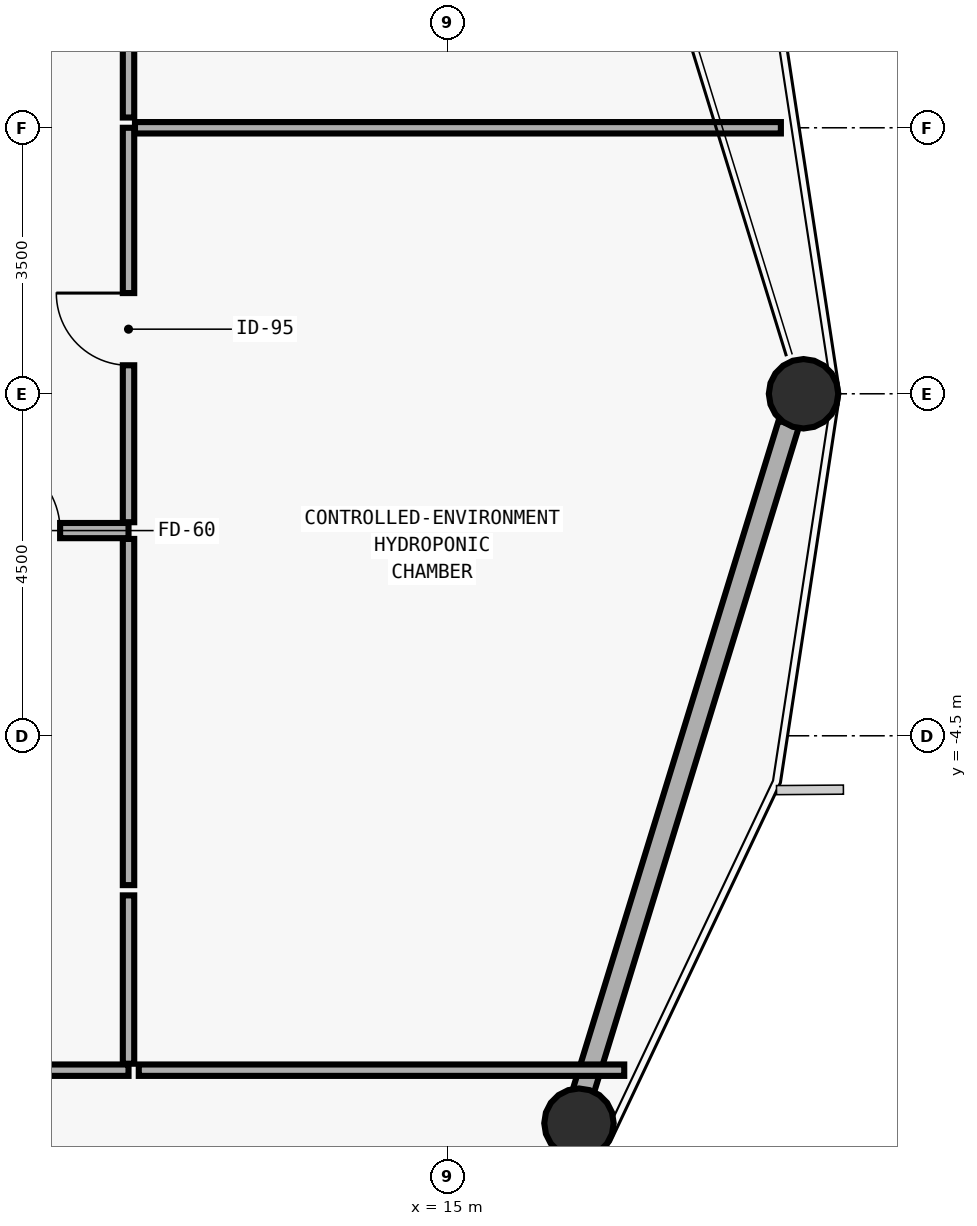
"""IFC4 building model, lengths in metres.
Left out: names, types, materials, properties, quantities, classifications, styles, units other than length and angle.
Written with IfcOpenShell. Run it as: python <this file> out.ifc"""

import sys

from ifc_helpers import new_model, si_unit, direction, frame, frame_2d, origin, origin_2d, place, context, subcontext, project, spatial, rectangle, hollow_circle, extrude, element, fill, save


model = new_model("IFC4")
c1 = context("Model", 3, precision=1e-05, world=origin(), true_north=direction((0.0, 1.0)))
c2 = subcontext(c1, "Body", "Model", "MODEL_VIEW")
j1 = project(units=[si_unit("LENGTHUNIT", "METRE"), si_unit("PLANEANGLEUNIT", "RADIAN")], contexts=[c1])
p1 = place(None, origin())
s1 = spatial("IfcSite", under=j1, at=p1, CompositionType="ELEMENT")
p2 = place(p1, origin())
s2 = spatial("IfcBuilding", under=s1, at=p2, CompositionType="ELEMENT")
p3 = place(p2, frame((0.0, 0.0, 51.0)))
s3 = spatial("IfcBuildingStorey", under=s2, at=p3, CompositionType="ELEMENT", Elevation=51.0)
p4 = place(p3, frame((19.608, 0.0, 0.0), z_axis=(0.037649698668, 0.0, 0.999290998754), x_axis=(0.0, 1.0, 0.0)))
e1 = element("IfcColumn", 1, at=p4, inside=s3, PredefinedType="COLUMN", context=c2, shape_type="SweptSolid", body=[
    extrude(hollow_circle(Radius=0.457, WallThickness=0.032, at=origin_2d()), origin(), (0.0, 0.0, 1.0), 3.878),
])
p5 = place(p3, frame((16.663, -9.569, 0.0), z_axis=(0.032615211628, -0.01467054886, 0.99936030688), x_axis=(0.410218260947, 0.911987378414, 0.0)))
e2 = element("IfcColumn", 2, at=p5, inside=s3, PredefinedType="COLUMN", context=c2, shape_type="SweptSolid", body=[
    extrude(hollow_circle(Radius=0.457, WallThickness=0.032, at=origin_2d()), origin(), (0.0, 0.0, 1.0), 3.877),
])
p6 = place(p3, frame((19.487, -0.394, 0.0), z_axis=(0.0, 0.0, 1.0), x_axis=(-0.29412506019, -0.95576694281, 0.0)))
e3 = element("IfcWall", 3, at=p6, inside=s3, PredefinedType="SOLIDWALL", context=c2, shape_type="SweptSolid", body=[
    extrude(rectangle(XDim=9.188, YDim=0.28, at=frame_2d((4.594, 0.0))), origin(), (0.0, 0.0, 1.0), 3.06),
])
p7 = place(p3, frame((8.16, -1.8, 0.0), z_axis=(0.0, 0.0, 1.0), x_axis=(1.0, 0.0, 0.0)))
e4 = element("IfcWall", 4, at=p7, inside=s3, PredefinedType="MOVABLE", context=c2, shape_type="SweptSolid", body=[
    extrude(rectangle(XDim=2.64, YDim=0.2, at=frame_2d((1.32, 0.0))), origin(), (0.0, 0.0, 1.0), 3.64),
])
p8 = place(p7, frame((0.74, 0.0, 0.0)))
e5 = element("IfcOpeningElement", 5, at=p8, cuts=e4, PredefinedType="OPENING", context=c2, shape_type="SweptSolid", body=[
    extrude(rectangle(XDim=1.0, YDim=2.1, at=frame_2d((0.5, 1.05))), frame((0.0, 0.11, 0.0), z_axis=(0.0, -1.0, 0.0), x_axis=(1.0, 0.0, 0.0)), (0.0, 0.0, 1.0), 0.22),
])
p9 = place(p3, frame((8.0, -8.9, 0.0), z_axis=(0.0, 0.0, 1.0), x_axis=(1.0, 0.0, 0.0)))
e6 = element("IfcWall", 6, at=p9, inside=s3, PredefinedType="PARTITIONING", context=c2, shape_type="SweptSolid", body=[
    extrude(rectangle(XDim=2.8, YDim=0.15, at=frame_2d((1.4, 0.0))), origin(), (0.0, 0.0, 1.0), 3.64),
])
p10 = place(p9, frame((0.575, 0.0, 0.0)))
e7 = element("IfcOpeningElement", 7, at=p10, cuts=e6, PredefinedType="OPENING", context=c2, shape_type="SweptSolid", body=[
    extrude(rectangle(XDim=0.95, YDim=2.1, at=frame_2d((0.475, 1.05))), frame((0.0, 0.085, 0.0), z_axis=(0.0, -1.0, 0.0), x_axis=(1.0, 0.0, 0.0)), (0.0, 0.0, 1.0), 0.17),
])
p11 = place(p3, frame((10.8, -1.69, 0.0), z_axis=(0.0, 0.0, 1.0), x_axis=(0.0, 1.0, 0.0)))
e8 = element("IfcWall", 8, at=p11, inside=s3, PredefinedType="PARTITIONING", context=c2, shape_type="SweptSolid", body=[
    extrude(rectangle(XDim=5.19, YDim=0.15, at=frame_2d((2.595, 0.0))), origin(), (0.0, 0.0, 1.0), 3.64),
])
p12 = place(p11, frame((2.065, 0.0, 0.0)))
e9 = element("IfcOpeningElement", 9, at=p12, cuts=e8, PredefinedType="OPENING", context=c2, shape_type="SweptSolid", body=[
    extrude(rectangle(XDim=0.95, YDim=2.1, at=frame_2d((0.475, 1.05))), frame((0.0, 0.085, 0.0), z_axis=(0.0, -1.0, 0.0), x_axis=(1.0, 0.0, 0.0)), (0.0, 0.0, 1.0), 0.17),
])
p13 = place(p3, frame((10.8, 3.635, 0.0), z_axis=(0.0, 0.0, 1.0), x_axis=(0.0, 1.0, 0.0)))
e10 = element("IfcWall", 10, at=p13, inside=s3, PredefinedType="PARTITIONING", context=c2, shape_type="SweptSolid", body=[
    extrude(rectangle(XDim=8.865, YDim=0.15, at=frame_2d((4.433, 0.0))), origin(), (0.0, 0.0, 1.0), 3.64),
])
p14 = place(p13, frame((3.89, 0.0, 0.0)))
e11 = element("IfcOpeningElement", 11, at=p14, cuts=e10, PredefinedType="OPENING", context=c2, shape_type="SweptSolid", body=[
    extrude(rectangle(XDim=0.95, YDim=2.1, at=frame_2d((0.475, 1.05))), frame((0.0, 0.085, 0.0), z_axis=(0.0, -1.0, 0.0), x_axis=(1.0, 0.0, 0.0)), (0.0, 0.0, 1.0), 0.17),
])
p15 = place(p3, frame((10.935, -8.9, 0.0), z_axis=(0.0, 0.0, 1.0), x_axis=(1.0, 0.0, 0.0)))
e12 = element("IfcWall", 12, at=p15, inside=s3, PredefinedType="PARTITIONING", context=c2, shape_type="SweptSolid", body=[
    extrude(rectangle(XDim=6.387, YDim=0.15, at=frame_2d((3.193, 0.0))), origin(), (0.0, 0.0, 1.0), 2.972),
])
p16 = place(p3, frame((10.8, -8.815, 0.0), z_axis=(0.0, 0.0, 1.0), x_axis=(0.0, 1.0, 0.0)))
e13 = element("IfcWall", 13, at=p16, inside=s3, PredefinedType="PARTITIONING", context=c2, shape_type="SweptSolid", body=[
    extrude(rectangle(XDim=2.215, YDim=0.15, at=frame_2d((1.107, 0.0))), origin(), (0.0, 0.0, 1.0), 3.64),
])
p17 = place(p3, frame((10.8, -6.465, 0.0), z_axis=(0.0, 0.0, 1.0), x_axis=(0.0, 1.0, 0.0)))
e14 = element("IfcWall", 14, at=p17, inside=s3, PredefinedType="PARTITIONING", context=c2, shape_type="SweptSolid", body=[
    extrude(rectangle(XDim=4.555, YDim=0.15, at=frame_2d((2.278, 0.0))), origin(), (0.0, 0.0, 1.0), 3.64),
])
p18 = place(p3, frame((10.885, 3.5, 0.0), z_axis=(0.0, 0.0, 1.0), x_axis=(1.0, 0.0, 0.0)))
e15 = element("IfcWall", 15, at=p18, inside=s3, PredefinedType="PARTITIONING", context=c2, shape_type="SweptSolid", body=[
    extrude(rectangle(XDim=8.498, YDim=0.15, at=frame_2d((4.249, 0.0))), origin(), (0.0, 0.0, 1.0), 3.64),
])
p19 = place(p8, origin())
e16 = element("IfcDoor", 16, at=p19, inside=s3, OperationType="SINGLE_SWING_LEFT", PredefinedType="DOOR", context=c2, shape_type="SweptSolid", body=[
    extrude(rectangle(XDim=1.0, YDim=2.1, at=frame_2d((0.5, 1.05))), frame((0.0, 0.025, 0.0), z_axis=(0.0, -1.0, 0.0), x_axis=(1.0, 0.0, 0.0)), (0.0, 0.0, 1.0), 0.05),
])
fill(e5, e16)
p20 = place(p12, origin())
e17 = element("IfcDoor", 17, at=p20, inside=s3, OperationType="SINGLE_SWING_RIGHT", PredefinedType="DOOR", context=c2, shape_type="SweptSolid", body=[
    extrude(rectangle(XDim=0.95, YDim=2.1, at=frame_2d((0.475, 1.05))), frame((0.0, 0.025, 0.0), z_axis=(0.0, -1.0, 0.0), x_axis=(1.0, 0.0, 0.0)), (0.0, 0.0, 1.0), 0.05),
])
fill(e9, e17)
save(model, sys.argv[1])
